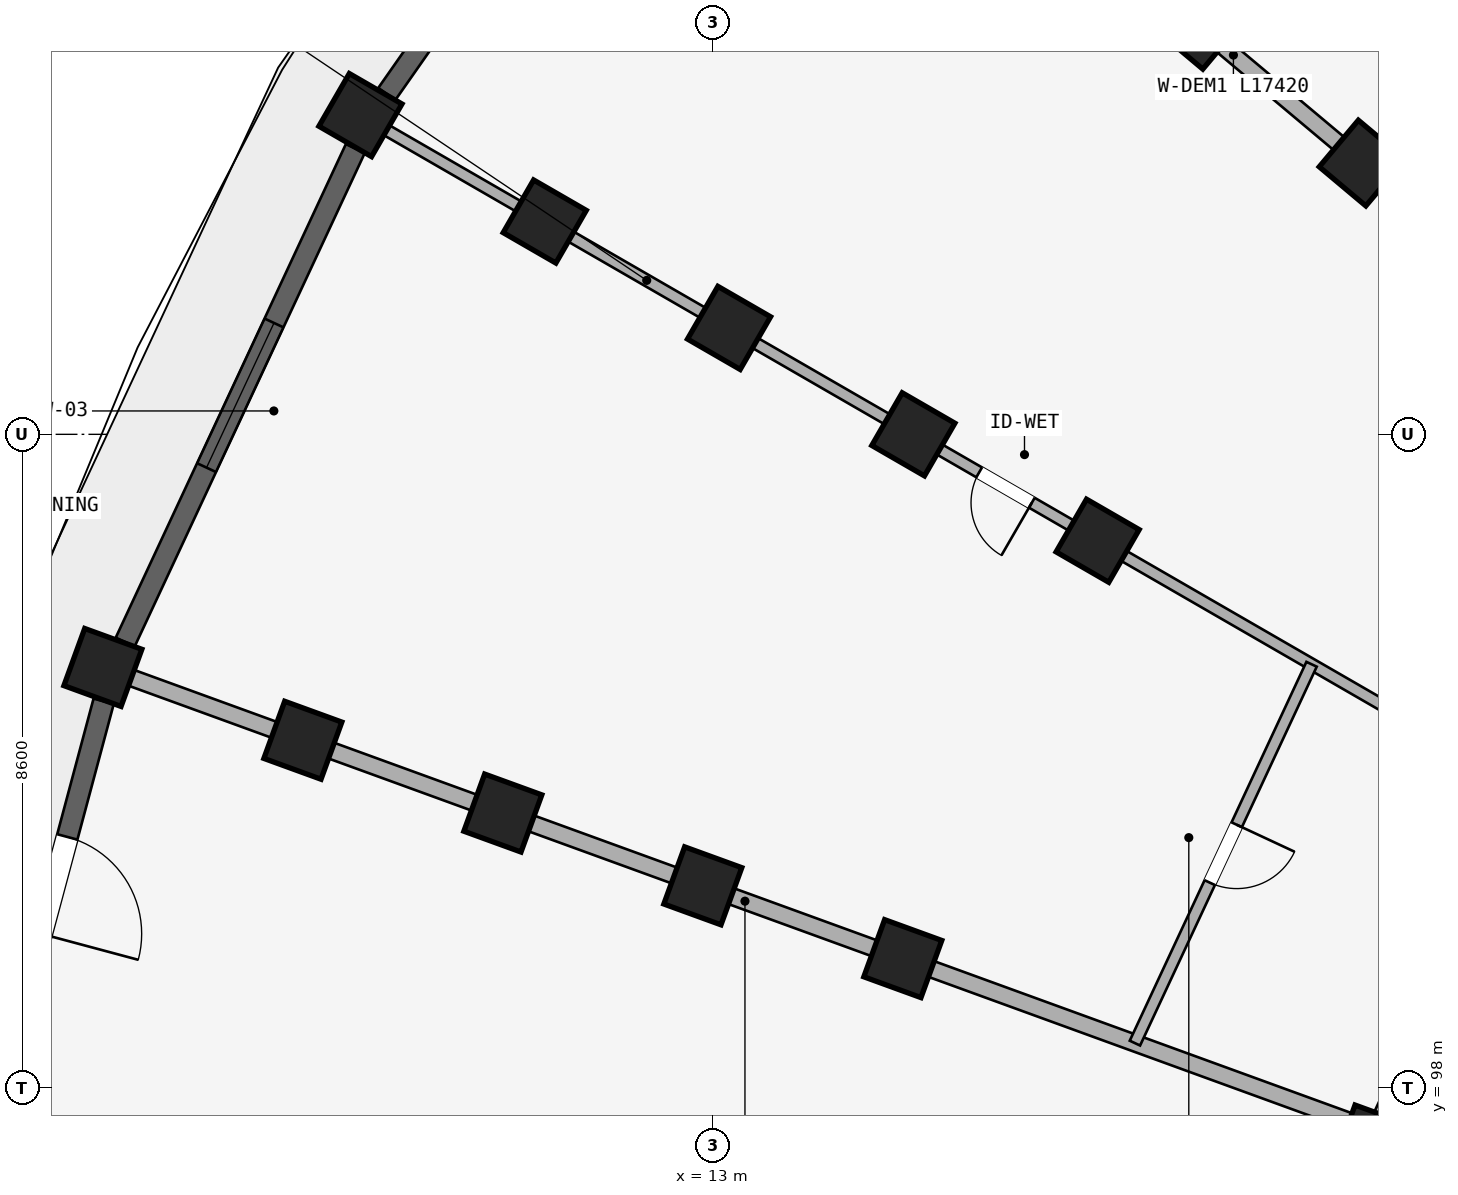
"""IFC4 building model, lengths in metres.
Left out: names, types, materials, properties, quantities, classifications, styles, units other than length and angle.
Written with IfcOpenShell. Run it as: python <this file> out.ifc"""

import sys

from ifc_helpers import new_model, si_unit, direction, frame, frame_2d, origin, origin_2d, place, context, subcontext, project, spatial, rectangle, extrude, element, fill, save


model = new_model("IFC4")
c1 = context("Model", 3, precision=1e-05, world=origin(), true_north=direction((0.0, 1.0)))
c2 = subcontext(c1, "Body", "Model", "MODEL_VIEW")
j1 = project(units=[si_unit("LENGTHUNIT", "METRE"), si_unit("PLANEANGLEUNIT", "RADIAN")], contexts=[c1])
p1 = place(None, origin())
s1 = spatial("IfcSite", under=j1, at=p1, CompositionType="ELEMENT")
p2 = place(p1, origin())
s2 = spatial("IfcBuilding", under=s1, at=p2, CompositionType="ELEMENT")
p3 = place(p2, frame((0.0, 0.0, 15.0)))
s3 = spatial("IfcBuildingStorey", under=s2, at=p3, CompositionType="ELEMENT", Elevation=15.0)
for number, where, z_axis, x_axis in (
    (1, (21.542, 110.169, 0.0), (0.0, 0.0, 1.0), (0.643, 0.766, 0.0)),
    (2, (19.397, 111.969, 0.0), (0.0, 0.0, 1.0), (0.643, 0.766, 0.0)),
    (3, (18.062, 105.2, 0.0), (0.0, 0.0, 1.0), (0.5, 0.866, 0.0)),
    (4, (15.637, 106.6, 0.0), (0.0, 0.0, 1.0), (0.5, 0.866, 0.0)),
    (5, (13.213, 108.0, 0.0), (0.0, 0.0, 1.0), (0.5, 0.866, 0.0)),
    (6, (10.788, 109.4, 0.0), (0.0, 0.0, 1.0), (0.5, 0.866, 0.0)),
    (7, (8.363, 110.8, 0.0), (0.0, 0.0, 1.0), (0.5, 0.866, 0.0)),
):
    element("IfcColumn", number, at=place(p3, frame(where, z_axis=z_axis, x_axis=x_axis)), inside=s3, PredefinedType="COLUMN", context=c2, shape_type="SweptSolid", body=[
        extrude(rectangle(XDim=0.8, YDim=0.8, at=origin_2d()), origin(), (0.0, 0.0, 1.0), 2.93),
    ])
p4 = place(p3, frame((21.701, 97.445, 0.0), z_axis=(0.0, 0.0, 1.0), x_axis=(0.342020143326, 0.939692620786, 0.0)))
e8 = element("IfcColumn", 8, at=p4, inside=s3, PredefinedType="COLUMN", context=c2, shape_type="SweptSolid", body=[
    extrude(rectangle(XDim=0.45, YDim=0.7, at=origin_2d()), origin(), (0.0, 0.0, 1.0), 2.93),
])
for number, where, z_axis, x_axis in (
    (9, (15.499, 99.702, 0.0), (0.0, 0.0, 1.0), (0.342, 0.94, 0.0)),
    (10, (12.868, 100.66, 0.0), (0.0, 0.0, 1.0), (0.342, 0.94, 0.0)),
    (11, (10.236, 101.618, 0.0), (0.0, 0.0, 1.0), (0.342, 0.94, 0.0)),
    (12, (7.605, 102.575, 0.0), (0.0, 0.0, 1.0), (0.342, 0.94, 0.0)),
    (13, (4.974, 103.533, 0.0), (0.0, 0.0, 1.0), (0.342, 0.94, 0.0)),
):
    element("IfcColumn", number, at=place(p3, frame(where, z_axis=z_axis, x_axis=x_axis)), inside=s3, PredefinedType="COLUMN", context=c2, shape_type="SweptSolid", body=[
        extrude(rectangle(XDim=0.8, YDim=0.8, at=origin_2d()), origin(), (0.0, 0.0, 1.0), 2.93),
    ])
p5 = place(p3, frame((23.778, 101.9, 0.0), z_axis=(0.0, 0.0, 1.0), x_axis=(-0.422629854778, -0.906302381024, 0.0)))
e14 = element("IfcWall", 14, at=p5, inside=s3, PredefinedType="STANDARD", context=c2, shape_type="SweptSolid", body=[
    extrude(rectangle(XDim=4.915, YDim=0.2, at=frame_2d((2.458, 0.0))), origin(), (0.0, 0.0, 1.0), 2.372),
])
p6 = place(p3, frame((30.009, 109.479, 0.0), z_axis=(0.0, 0.0, 1.0), x_axis=(-0.642784757967, 0.766046835987, 0.0)))
e15 = element("IfcWall", 15, at=p6, inside=s3, PredefinedType="PARTITIONING", context=c2, shape_type="SweptSolid", body=[
    extrude(rectangle(XDim=17.42, YDim=0.15, at=frame_2d((8.71, 0.0))), origin(), (0.0, 0.0, 1.0), 2.372),
])
p7 = place(p6, frame((7.5, 0.0, 0.0)))
e16 = element("IfcOpeningElement", 16, at=p7, cuts=e15, PredefinedType="OPENING", context=c2, shape_type="SweptSolid", body=[
    extrude(rectangle(XDim=0.8, YDim=2.1, at=frame_2d((0.4, 1.05))), frame((0.0, 0.085, 0.0), z_axis=(0.0, -1.0, 0.0), x_axis=(1.0, 0.0, 0.0)), (0.0, 0.0, 1.0), 0.17),
])
p8 = place(p3, frame((26.521, 105.991, 0.0), z_axis=(0.0, 0.0, 1.0), x_axis=(-0.766046835987, 0.642784757967, 0.0)))
e17 = element("IfcWall", 17, at=p8, inside=s3, PredefinedType="STANDARD", context=c2, shape_type="SweptSolid", body=[
    extrude(rectangle(XDim=17.42, YDim=0.22, at=frame_2d((8.71, 0.0))), origin(), (0.0, 0.0, 1.0), 2.372),
])
p9 = place(p3, frame((23.691, 101.95, 0.0), z_axis=(0.0, 0.0, 1.0), x_axis=(-0.866026648973, 0.499997843263, 0.0)))
e18 = element("IfcWall", 18, at=p9, inside=s3, PredefinedType="PARTITIONING", context=c2, shape_type="SweptSolid", body=[
    extrude(rectangle(XDim=17.42, YDim=0.15, at=frame_2d((8.71, 0.0))), origin(), (0.0, 0.0, 1.0), 2.372),
])
p10 = place(p9, frame((7.5, 0.0, 0.0)))
e19 = element("IfcOpeningElement", 19, at=p10, cuts=e18, PredefinedType="OPENING", context=c2, shape_type="SweptSolid", body=[
    extrude(rectangle(XDim=0.8, YDim=2.1, at=frame_2d((0.4, 1.05))), frame((0.0, 0.085, 0.0), z_axis=(0.0, -1.0, 0.0), x_axis=(1.0, 0.0, 0.0)), (0.0, 0.0, 1.0), 0.17),
])
p11 = place(p3, frame((21.607, 97.479, 0.0), z_axis=(0.0, 0.0, 1.0), x_axis=(-0.939691901159, 0.342022120477, 0.0)))
e20 = element("IfcWall", 20, at=p11, inside=s3, PredefinedType="STANDARD", context=c2, shape_type="SweptSolid", body=[
    extrude(rectangle(XDim=17.42, YDim=0.22, at=frame_2d((8.71, 0.0))), origin(), (0.0, 0.0, 1.0), 2.372),
])
p12 = place(p3, frame((20.877, 103.575, 0.0), z_axis=(0.0, 0.0, 1.0), x_axis=(-0.422630264446, -0.906302189986, 0.0)))
e21 = element("IfcWall", 21, at=p12, inside=s3, PredefinedType="PLUMBINGWALL", context=c2, shape_type="SweptSolid", body=[
    extrude(rectangle(XDim=5.5, YDim=0.15, at=frame_2d((2.75, 0.0))), origin(), (0.0, 0.0, 1.0), 2.372),
])
p13 = place(p12, frame((2.33, 0.0, 0.0)))
e22 = element("IfcOpeningElement", 22, at=p13, cuts=e21, PredefinedType="OPENING", context=c2, shape_type="SweptSolid", body=[
    extrude(rectangle(XDim=0.84, YDim=2.1, at=frame_2d((0.42, 1.05))), frame((0.0, 0.085, 0.0), z_axis=(0.0, -1.0, 0.0), x_axis=(1.0, 0.0, 0.0)), (0.0, 0.0, 1.0), 0.17),
])
p14 = place(p3, frame((12.819, 116.947, 0.0), z_axis=(0.0, 0.0, 1.0), x_axis=(-0.573562972382, -0.819161471697, 0.0)))
e23 = element("IfcWall", 23, at=p14, inside=s3, PredefinedType="STANDARD", context=c2, shape_type="SweptSolid", body=[
    extrude(rectangle(XDim=7.164, YDim=0.275, at=frame_2d((3.582, 0.0))), origin(), (0.0, 0.0, 1.0), 2.472),
])
p15 = place(p14, frame((2.457, 0.0, 0.322)))
e24 = element("IfcOpeningElement", 24, at=p15, cuts=e23, PredefinedType="OPENING", context=c2, shape_type="SweptSolid", body=[
    extrude(rectangle(XDim=2.25, YDim=1.95, at=frame_2d((1.125, 0.975))), frame((0.0, 0.147, 0.0), z_axis=(0.0, -1.0, 0.0), x_axis=(1.0, 0.0, 0.0)), (0.0, 0.0, 1.0), 0.295),
])
p16 = place(p3, frame((8.296, 110.36, 0.0), z_axis=(0.0, 0.0, 1.0), x_axis=(-0.422633596215, -0.906300636296, 0.0)))
e25 = element("IfcWall", 25, at=p16, inside=s3, PredefinedType="STANDARD", context=c2, shape_type="SweptSolid", body=[
    extrude(rectangle(XDim=7.164, YDim=0.275, at=frame_2d((3.582, 0.0))), origin(), (0.0, 0.0, 1.0), 2.472),
])
p17 = place(p16, frame((2.532, 0.0, 0.472)))
e26 = element("IfcOpeningElement", 26, at=p17, cuts=e25, PredefinedType="OPENING", context=c2, shape_type="SweptSolid", body=[
    extrude(rectangle(XDim=2.1, YDim=1.8, at=frame_2d((1.05, 0.9))), frame((0.0, 0.147, 0.0), z_axis=(0.0, -1.0, 0.0), x_axis=(1.0, 0.0, 0.0)), (0.0, 0.0, 1.0), 0.295),
])
p18 = place(p3, frame((4.984, 103.088, 0.0), z_axis=(0.0, 0.0, 1.0), x_axis=(-0.258826933296, -0.965923712619, 0.0)))
e27 = element("IfcWall", 27, at=p18, inside=s3, PredefinedType="STANDARD", context=c2, shape_type="SweptSolid", body=[
    extrude(rectangle(XDim=7.164, YDim=0.275, at=frame_2d((3.582, 0.0))), origin(), (0.0, 0.0, 1.0), 2.472),
])
p19 = place(p18, frame((4.69, 0.0, 0.422)))
e28 = element("IfcOpeningElement", 28, at=p19, cuts=e27, PredefinedType="OPENING", context=c2, shape_type="SweptSolid", body=[
    extrude(rectangle(XDim=1.2, YDim=1.5, at=frame_2d((0.6, 0.75))), frame((0.0, 0.147, 0.0), z_axis=(0.0, -1.0, 0.0), x_axis=(1.0, 0.0, 0.0)), (0.0, 0.0, 1.0), 0.295),
])
p20 = place(p18, frame((1.847, 0.0, 0.0)))
e29 = element("IfcOpeningElement", 29, at=p20, cuts=e27, PredefinedType="OPENING", context=c2, shape_type="SweptSolid", body=[
    extrude(rectangle(XDim=1.32, YDim=2.15, at=frame_2d((0.66, 1.075))), frame((0.0, 0.147, 0.0), z_axis=(0.0, -1.0, 0.0), x_axis=(1.0, 0.0, 0.0)), (0.0, 0.0, 1.0), 0.295),
])
p21 = place(p17, origin())
e30 = element("IfcWindow", 30, at=p21, inside=s3, PartitioningType="TRIPLE_PANEL_VERTICAL", PredefinedType="WINDOW", context=c2, shape_type="SweptSolid", body=[
    extrude(rectangle(XDim=2.1, YDim=1.8, at=frame_2d((1.05, 0.9))), frame((0.0, 0.03, 0.0), z_axis=(0.0, -1.0, 0.0), x_axis=(1.0, 0.0, 0.0)), (0.0, 0.0, 1.0), 0.06),
])
fill(e26, e30)
p22 = place(p10, origin())
e31 = element("IfcDoor", 31, at=p22, inside=s3, OperationType="SINGLE_SWING_LEFT", PredefinedType="DOOR", context=c2, shape_type="SweptSolid", body=[
    extrude(rectangle(XDim=0.8, YDim=2.1, at=frame_2d((0.4, 1.05))), frame((0.0, 0.025, 0.0), z_axis=(0.0, -1.0, 0.0), x_axis=(1.0, 0.0, 0.0)), (0.0, 0.0, 1.0), 0.05),
])
fill(e19, e31)
p23 = place(p13, origin())
e32 = element("IfcDoor", 32, at=p23, inside=s3, OperationType="SINGLE_SWING_LEFT", PredefinedType="DOOR", context=c2, shape_type="SweptSolid", body=[
    extrude(rectangle(XDim=0.84, YDim=2.1, at=frame_2d((0.42, 1.05))), frame((0.0, 0.025, 0.0), z_axis=(0.0, -1.0, 0.0), x_axis=(1.0, 0.0, 0.0)), (0.0, 0.0, 1.0), 0.05),
])
fill(e22, e32)
p24 = place(p20, frame((1.32, 0.0, 0.0), z_axis=(0.0, 0.0, 1.0), x_axis=(-1.0, 0.0, 0.0)))
e33 = element("IfcDoor", 33, at=p24, inside=s3, OperationType="SINGLE_SWING_LEFT", PredefinedType="DOOR", context=c2, shape_type="SweptSolid", body=[
    extrude(rectangle(XDim=1.32, YDim=2.15, at=frame_2d((0.66, 1.075))), frame((0.0, 0.025, 0.0), z_axis=(0.0, -1.0, 0.0), x_axis=(1.0, 0.0, 0.0)), (0.0, 0.0, 1.0), 0.05),
])
fill(e29, e33)
save(model, sys.argv[1])
